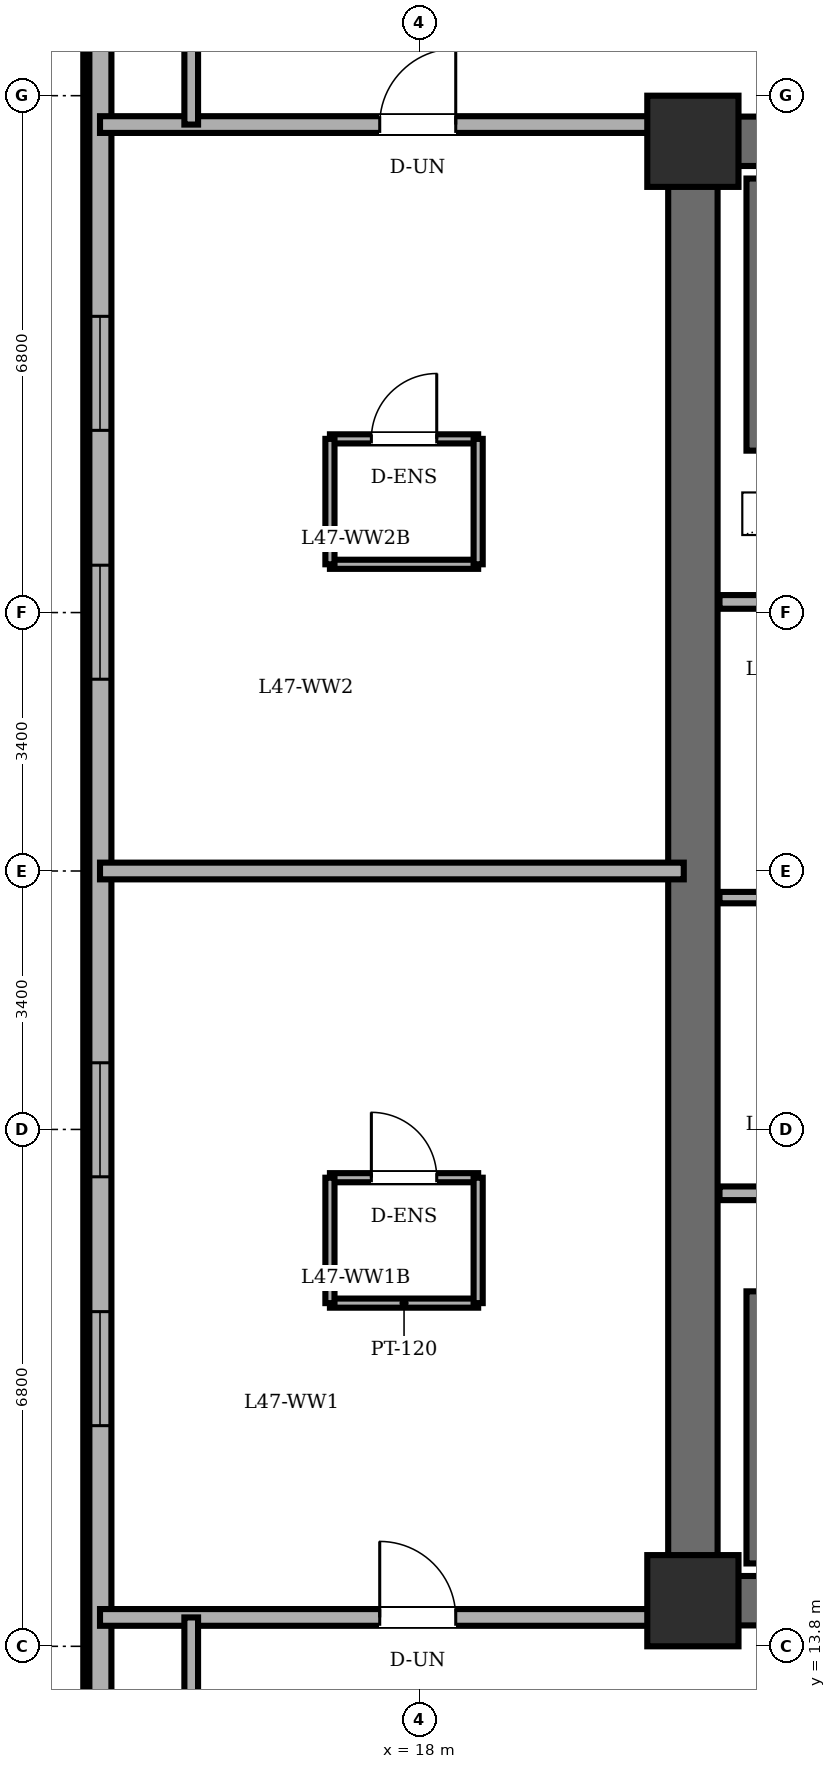
"""IFC4 building model, lengths in metres.
Left out: names, types, materials, properties, quantities, classifications, styles, units other than length and angle.
Written with IfcOpenShell. Run it as: python <this file> out.ifc"""

import sys

from ifc_helpers import new_model, si_unit, direction, frame, frame_2d, origin, origin_2d, place, context, subcontext, project, spatial, rectangle, extrude, element, fill, save


model = new_model("IFC4")
c1 = context("Model", 3, precision=1e-05, world=origin(), true_north=direction((0.0, 1.0)))
c2 = subcontext(c1, "Body", "Model", "MODEL_VIEW")
j1 = project(units=[si_unit("LENGTHUNIT", "METRE"), si_unit("PLANEANGLEUNIT", "RADIAN")], contexts=[c1])
p1 = place(None, origin())
s1 = spatial("IfcSite", under=j1, at=p1, CompositionType="ELEMENT")
p2 = place(p1, origin())
s2 = spatial("IfcBuilding", under=s1, at=p2, CompositionType="ELEMENT")
p3 = place(p2, frame((0.0, 0.0, 179.8)))
s3 = spatial("IfcBuildingStorey", under=s2, at=p3, CompositionType="ELEMENT", Elevation=179.8)
for number, where, z_axis, x_axis in (
    (1, (21.6, 14.4, 0.0), (0.0, 0.0, 1.0), (1.0, 0.0, 0.0)),
    (2, (21.6, 33.6, 0.0), (0.0, 0.0, 1.0), (1.0, 0.0, 0.0)),
):
    element("IfcColumn", number, at=place(p3, frame(where, z_axis=z_axis, x_axis=x_axis)), inside=s3, PredefinedType="COLUMN", context=c2, shape_type="SweptSolid", body=[
        extrude(rectangle(XDim=1.2, YDim=1.2, at=origin_2d()), origin(), (0.0, 0.0, 1.0), 3.6),
    ])
p4 = place(p3, frame((13.8, 36.3, 0.0), z_axis=(0.0, 0.0, 1.0), x_axis=(0.0, -1.0, 0.0)))
e3 = element("IfcWall", 3, at=p4, inside=s3, PredefinedType="SOLIDWALL", context=c2, shape_type="SweptSolid", body=[
    extrude(rectangle(XDim=24.6, YDim=0.3, at=frame_2d((12.3, 0.0))), origin(), (0.0, 0.0, 1.0), 3.4),
])
p5 = place(p4, frame((5.003, 0.0, 0.85)))
e4 = element("IfcOpeningElement", 4, at=p5, cuts=e3, PredefinedType="OPENING", context=c2, shape_type="SweptSolid", body=[
    extrude(rectangle(XDim=1.5, YDim=1.55, at=frame_2d((0.75, 0.775))), frame((0.0, 0.16, 0.0), z_axis=(0.0, -1.0, 0.0), x_axis=(1.0, 0.0, 0.0)), (0.0, 0.0, 1.0), 0.32),
])
p6 = place(p4, frame((8.277, 0.0, 0.85)))
e5 = element("IfcOpeningElement", 5, at=p6, cuts=e3, PredefinedType="OPENING", context=c2, shape_type="SweptSolid", body=[
    extrude(rectangle(XDim=1.5, YDim=1.55, at=frame_2d((0.75, 0.775))), frame((0.0, 0.16, 0.0), z_axis=(0.0, -1.0, 0.0), x_axis=(1.0, 0.0, 0.0)), (0.0, 0.0, 1.0), 0.32),
])
p7 = place(p4, frame((14.823, 0.0, 0.85)))
e6 = element("IfcOpeningElement", 6, at=p7, cuts=e3, PredefinedType="OPENING", context=c2, shape_type="SweptSolid", body=[
    extrude(rectangle(XDim=1.5, YDim=1.55, at=frame_2d((0.75, 0.775))), frame((0.0, 0.16, 0.0), z_axis=(0.0, -1.0, 0.0), x_axis=(1.0, 0.0, 0.0)), (0.0, 0.0, 1.0), 0.32),
])
p8 = place(p4, frame((18.097, 0.0, 0.85)))
e7 = element("IfcOpeningElement", 7, at=p8, cuts=e3, PredefinedType="OPENING", context=c2, shape_type="SweptSolid", body=[
    extrude(rectangle(XDim=1.5, YDim=1.55, at=frame_2d((0.75, 0.775))), frame((0.0, 0.16, 0.0), z_axis=(0.0, -1.0, 0.0), x_axis=(1.0, 0.0, 0.0)), (0.0, 0.0, 1.0), 0.32),
])
p9 = place(p3, frame((21.6, 14.4, 0.0), z_axis=(0.0, 0.0, 1.0), x_axis=(0.0, 1.0, 0.0)))
e8 = element("IfcWall", 8, at=p9, inside=s3, PredefinedType="SHEAR", context=c2, shape_type="SweptSolid", body=[
    extrude(rectangle(XDim=19.2, YDim=0.65, at=frame_2d((9.6, 0.0))), origin(), (0.0, 0.0, 1.0), 3.4),
])
for number, where, z_axis, x_axis in (
    (9, (21.6, 33.6, 0.0), (0.0, 0.0, 1.0), (1.0, 0.0, 0.0)),
    (10, (37.2, 14.4, 0.0), (0.0, 0.0, 1.0), (-1.0, 0.0, 0.0)),
):
    element("IfcWall", number, at=place(p3, frame(where, z_axis=z_axis, x_axis=x_axis)), inside=s3, PredefinedType="SHEAR", context=c2, shape_type="SweptSolid", body=[
        extrude(rectangle(XDim=15.6, YDim=0.65, at=frame_2d((7.8, 0.0))), origin(), (0.0, 0.0, 1.0), 3.4),
    ])
for number, where, z_axis, x_axis in (
    (11, (22.48, 29.53, 0.0), (0.0, 0.0, 1.0), (0.0, 1.0, 0.0)),
    (12, (22.48, 14.89, 0.0), (0.0, 0.0, 1.0), (0.0, 1.0, 0.0)),
):
    element("IfcWall", number, at=place(p3, frame(where, z_axis=z_axis, x_axis=x_axis)), inside=s3, PredefinedType="SOLIDWALL", context=c2, shape_type="SweptSolid", body=[
        extrude(rectangle(XDim=3.58, YDim=0.35, at=frame_2d((1.79, 0.0))), origin(), (0.0, 0.0, 1.0), 3.4),
    ])
p10 = place(p3, frame((21.95, 27.54, 0.0), z_axis=(0.0, 0.0, 1.0), x_axis=(1.0, 0.0, 0.0)))
e13 = element("IfcWall", 13, at=p10, inside=s3, PredefinedType="PARTITIONING", context=c2, shape_type="SweptSolid", body=[
    extrude(rectangle(XDim=10.56, YDim=0.18, at=frame_2d((5.28, 0.0))), origin(), (0.0, 0.0, 1.0), 3.4),
])
p11 = place(p3, frame((21.95, 19.76, 0.0), z_axis=(0.0, 0.0, 1.0), x_axis=(1.0, 0.0, 0.0)))
e14 = element("IfcWall", 14, at=p11, inside=s3, PredefinedType="PARTITIONING", context=c2, shape_type="SweptSolid", body=[
    extrude(rectangle(XDim=14.87, YDim=0.18, at=frame_2d((7.435, 0.0))), origin(), (0.0, 0.0, 1.0), 3.4),
])
p12 = place(p3, frame((21.95, 23.65, 0.0), z_axis=(0.0, 0.0, 1.0), x_axis=(1.0, 0.0, 0.0)))
e15 = element("IfcWall", 15, at=p12, inside=s3, PredefinedType="PARTITIONING", context=c2, shape_type="SweptSolid", body=[
    extrude(rectangle(XDim=2.51, YDim=0.15, at=frame_2d((1.255, 0.0))), origin(), (0.0, 0.0, 1.0), 3.4),
])
p13 = place(p3, frame((16.825, 19.965, 0.0), z_axis=(0.0, 0.0, 1.0), x_axis=(1.0, 0.0, 0.0)))
e16 = element("IfcWall", 16, at=p13, inside=s3, PredefinedType="PARTITIONING", context=c2, shape_type="SweptSolid", body=[
    extrude(rectangle(XDim=1.95, YDim=0.12, at=frame_2d((0.975, 0.0))), origin(), (0.0, 0.0, 1.0), 3.4),
])
p14 = place(p13, frame((0.545, 0.0, 0.0)))
e17 = element("IfcOpeningElement", 17, at=p14, cuts=e16, PredefinedType="OPENING", context=c2, shape_type="SweptSolid", body=[
    extrude(rectangle(XDim=0.86, YDim=2.1, at=frame_2d((0.43, 1.05))), frame((0.0, 0.07, 0.0), z_axis=(0.0, -1.0, 0.0), x_axis=(1.0, 0.0, 0.0)), (0.0, 0.0, 1.0), 0.14),
])
p15 = place(p3, frame((18.775, 18.315, 0.0), z_axis=(0.0, 0.0, 1.0), x_axis=(-1.0, 0.0, 0.0)))
e18 = element("IfcWall", 18, at=p15, inside=s3, PredefinedType="PARTITIONING", context=c2, shape_type="SweptSolid", body=[
    extrude(rectangle(XDim=1.95, YDim=0.12, at=frame_2d((0.975, 0.0))), origin(), (0.0, 0.0, 1.0), 3.4),
])
for number, where, z_axis, x_axis in (
    (19, (16.825, 19.965, 0.0), (0.0, 0.0, 1.0), (0.0, -1.0, 0.0)),
    (20, (18.775, 18.315, 0.0), (0.0, 0.0, 1.0), (0.0, 1.0, 0.0)),
):
    element("IfcWall", number, at=place(p3, frame(where, z_axis=z_axis, x_axis=x_axis)), inside=s3, PredefinedType="PARTITIONING", context=c2, shape_type="SweptSolid", body=[
        extrude(rectangle(XDim=1.65, YDim=0.12, at=frame_2d((0.825, 0.0))), origin(), (0.0, 0.0, 1.0), 3.4),
    ])
p16 = place(p3, frame((16.825, 29.685, 0.0), z_axis=(0.0, 0.0, 1.0), x_axis=(1.0, 0.0, 0.0)))
e21 = element("IfcWall", 21, at=p16, inside=s3, PredefinedType="PARTITIONING", context=c2, shape_type="SweptSolid", body=[
    extrude(rectangle(XDim=1.95, YDim=0.12, at=frame_2d((0.975, 0.0))), origin(), (0.0, 0.0, 1.0), 3.4),
])
p17 = place(p16, frame((0.545, 0.0, 0.0)))
e22 = element("IfcOpeningElement", 22, at=p17, cuts=e21, PredefinedType="OPENING", context=c2, shape_type="SweptSolid", body=[
    extrude(rectangle(XDim=0.86, YDim=2.1, at=frame_2d((0.43, 1.05))), frame((0.0, 0.07, 0.0), z_axis=(0.0, -1.0, 0.0), x_axis=(1.0, 0.0, 0.0)), (0.0, 0.0, 1.0), 0.14),
])
p18 = place(p3, frame((18.775, 28.035, 0.0), z_axis=(0.0, 0.0, 1.0), x_axis=(-1.0, 0.0, 0.0)))
e23 = element("IfcWall", 23, at=p18, inside=s3, PredefinedType="PARTITIONING", context=c2, shape_type="SweptSolid", body=[
    extrude(rectangle(XDim=1.95, YDim=0.12, at=frame_2d((0.975, 0.0))), origin(), (0.0, 0.0, 1.0), 3.4),
])
for number, where, z_axis, x_axis in (
    (24, (16.825, 29.685, 0.0), (0.0, 0.0, 1.0), (0.0, -1.0, 0.0)),
    (25, (18.775, 28.035, 0.0), (0.0, 0.0, 1.0), (0.0, 1.0, 0.0)),
):
    element("IfcWall", number, at=place(p3, frame(where, z_axis=z_axis, x_axis=x_axis)), inside=s3, PredefinedType="PARTITIONING", context=c2, shape_type="SweptSolid", body=[
        extrude(rectangle(XDim=1.65, YDim=0.12, at=frame_2d((0.825, 0.0))), origin(), (0.0, 0.0, 1.0), 3.4),
    ])
p19 = place(p3, frame((13.8, 14.18, 0.0), z_axis=(0.0, 0.0, 1.0), x_axis=(1.0, 0.0, 0.0)))
e26 = element("IfcWall", 26, at=p19, inside=s3, PredefinedType="PARTITIONING", context=c2, shape_type="SweptSolid", body=[
    extrude(rectangle(XDim=7.68, YDim=0.22, at=frame_2d((3.84, 0.0))), origin(), (0.0, 0.0, 1.0), 3.4),
])
p20 = place(p19, frame((3.68, 0.0, 0.0)))
e27 = element("IfcOpeningElement", 27, at=p20, cuts=e26, PredefinedType="OPENING", context=c2, shape_type="SweptSolid", body=[
    extrude(rectangle(XDim=1.0, YDim=2.15, at=frame_2d((0.5, 1.075))), frame((0.0, 0.12, 0.0), z_axis=(0.0, -1.0, 0.0), x_axis=(1.0, 0.0, 0.0)), (0.0, 0.0, 1.0), 0.24),
])
p21 = place(p3, frame((13.8, 24.0, 0.0), z_axis=(0.0, 0.0, 1.0), x_axis=(1.0, 0.0, 0.0)))
e28 = element("IfcWall", 28, at=p21, inside=s3, PredefinedType="PARTITIONING", context=c2, shape_type="SweptSolid", body=[
    extrude(rectangle(XDim=7.68, YDim=0.22, at=frame_2d((3.84, 0.0))), origin(), (0.0, 0.0, 1.0), 3.4),
])
p22 = place(p3, frame((13.8, 33.82, 0.0), z_axis=(0.0, 0.0, 1.0), x_axis=(1.0, 0.0, 0.0)))
e29 = element("IfcWall", 29, at=p22, inside=s3, PredefinedType="PARTITIONING", context=c2, shape_type="SweptSolid", body=[
    extrude(rectangle(XDim=7.68, YDim=0.22, at=frame_2d((3.84, 0.0))), origin(), (0.0, 0.0, 1.0), 3.4),
])
p23 = place(p22, frame((3.68, 0.0, 0.0)))
e30 = element("IfcOpeningElement", 30, at=p23, cuts=e29, PredefinedType="OPENING", context=c2, shape_type="SweptSolid", body=[
    extrude(rectangle(XDim=1.0, YDim=2.15, at=frame_2d((0.5, 1.075))), frame((0.0, 0.12, 0.0), z_axis=(0.0, -1.0, 0.0), x_axis=(1.0, 0.0, 0.0)), (0.0, 0.0, 1.0), 0.24),
])
for number, where, z_axis, x_axis in (
    (31, (15.0, 8.487, 0.0), (0.0, 0.0, 1.0), (0.0, 1.0, 0.0)),
    (32, (15.0, 33.82, 0.0), (0.0, 0.0, 1.0), (0.0, 1.0, 0.0)),
):
    element("IfcWall", number, at=place(p3, frame(where, z_axis=z_axis, x_axis=x_axis)), inside=s3, PredefinedType="PARTITIONING", context=c2, shape_type="SweptSolid", body=[
        extrude(rectangle(XDim=5.693, YDim=0.18, at=frame_2d((2.846, 0.0))), origin(), (0.0, 0.0, 1.0), 3.4),
    ])
p24 = place(p5, origin())
e33 = element("IfcWindow", 33, at=p24, inside=s3, PartitioningType="DOUBLE_PANEL_VERTICAL", PredefinedType="WINDOW", context=c2, shape_type="SweptSolid", body=[
    extrude(rectangle(XDim=1.5, YDim=1.55, at=frame_2d((0.75, 0.775))), frame((0.0, 0.03, 0.0), z_axis=(0.0, -1.0, 0.0), x_axis=(1.0, 0.0, 0.0)), (0.0, 0.0, 1.0), 0.06),
])
fill(e4, e33)
p25 = place(p6, origin())
e34 = element("IfcWindow", 34, at=p25, inside=s3, PartitioningType="DOUBLE_PANEL_VERTICAL", PredefinedType="WINDOW", context=c2, shape_type="SweptSolid", body=[
    extrude(rectangle(XDim=1.5, YDim=1.55, at=frame_2d((0.75, 0.775))), frame((0.0, 0.03, 0.0), z_axis=(0.0, -1.0, 0.0), x_axis=(1.0, 0.0, 0.0)), (0.0, 0.0, 1.0), 0.06),
])
fill(e5, e34)
p26 = place(p7, origin())
e35 = element("IfcWindow", 35, at=p26, inside=s3, PartitioningType="DOUBLE_PANEL_VERTICAL", PredefinedType="WINDOW", context=c2, shape_type="SweptSolid", body=[
    extrude(rectangle(XDim=1.5, YDim=1.55, at=frame_2d((0.75, 0.775))), frame((0.0, 0.03, 0.0), z_axis=(0.0, -1.0, 0.0), x_axis=(1.0, 0.0, 0.0)), (0.0, 0.0, 1.0), 0.06),
])
fill(e6, e35)
p27 = place(p8, origin())
e36 = element("IfcWindow", 36, at=p27, inside=s3, PartitioningType="DOUBLE_PANEL_VERTICAL", PredefinedType="WINDOW", context=c2, shape_type="SweptSolid", body=[
    extrude(rectangle(XDim=1.5, YDim=1.55, at=frame_2d((0.75, 0.775))), frame((0.0, 0.03, 0.0), z_axis=(0.0, -1.0, 0.0), x_axis=(1.0, 0.0, 0.0)), (0.0, 0.0, 1.0), 0.06),
])
fill(e7, e36)
p28 = place(p14, origin())
e37 = element("IfcDoor", 37, at=p28, inside=s3, OperationType="SINGLE_SWING_LEFT", PredefinedType="DOOR", context=c2, shape_type="SweptSolid", body=[
    extrude(rectangle(XDim=0.86, YDim=2.1, at=frame_2d((0.43, 1.05))), frame((0.0, 0.025, 0.0), z_axis=(0.0, -1.0, 0.0), x_axis=(1.0, 0.0, 0.0)), (0.0, 0.0, 1.0), 0.05),
])
fill(e17, e37)
p29 = place(p17, origin())
e38 = element("IfcDoor", 38, at=p29, inside=s3, OperationType="SINGLE_SWING_RIGHT", PredefinedType="DOOR", context=c2, shape_type="SweptSolid", body=[
    extrude(rectangle(XDim=0.86, YDim=2.1, at=frame_2d((0.43, 1.05))), frame((0.0, 0.025, 0.0), z_axis=(0.0, -1.0, 0.0), x_axis=(1.0, 0.0, 0.0)), (0.0, 0.0, 1.0), 0.05),
])
fill(e22, e38)
p30 = place(p20, origin())
e39 = element("IfcDoor", 39, at=p30, inside=s3, OperationType="SINGLE_SWING_LEFT", PredefinedType="DOOR", context=c2, shape_type="SweptSolid", body=[
    extrude(rectangle(XDim=1.0, YDim=2.15, at=frame_2d((0.5, 1.075))), frame((0.0, 0.025, 0.0), z_axis=(0.0, -1.0, 0.0), x_axis=(1.0, 0.0, 0.0)), (0.0, 0.0, 1.0), 0.05),
])
fill(e27, e39)
p31 = place(p23, origin())
e40 = element("IfcDoor", 40, at=p31, inside=s3, OperationType="SINGLE_SWING_RIGHT", PredefinedType="DOOR", context=c2, shape_type="SweptSolid", body=[
    extrude(rectangle(XDim=1.0, YDim=2.15, at=frame_2d((0.5, 1.075))), frame((0.0, 0.025, 0.0), z_axis=(0.0, -1.0, 0.0), x_axis=(1.0, 0.0, 0.0)), (0.0, 0.0, 1.0), 0.05),
])
fill(e30, e40)
save(model, sys.argv[1])
